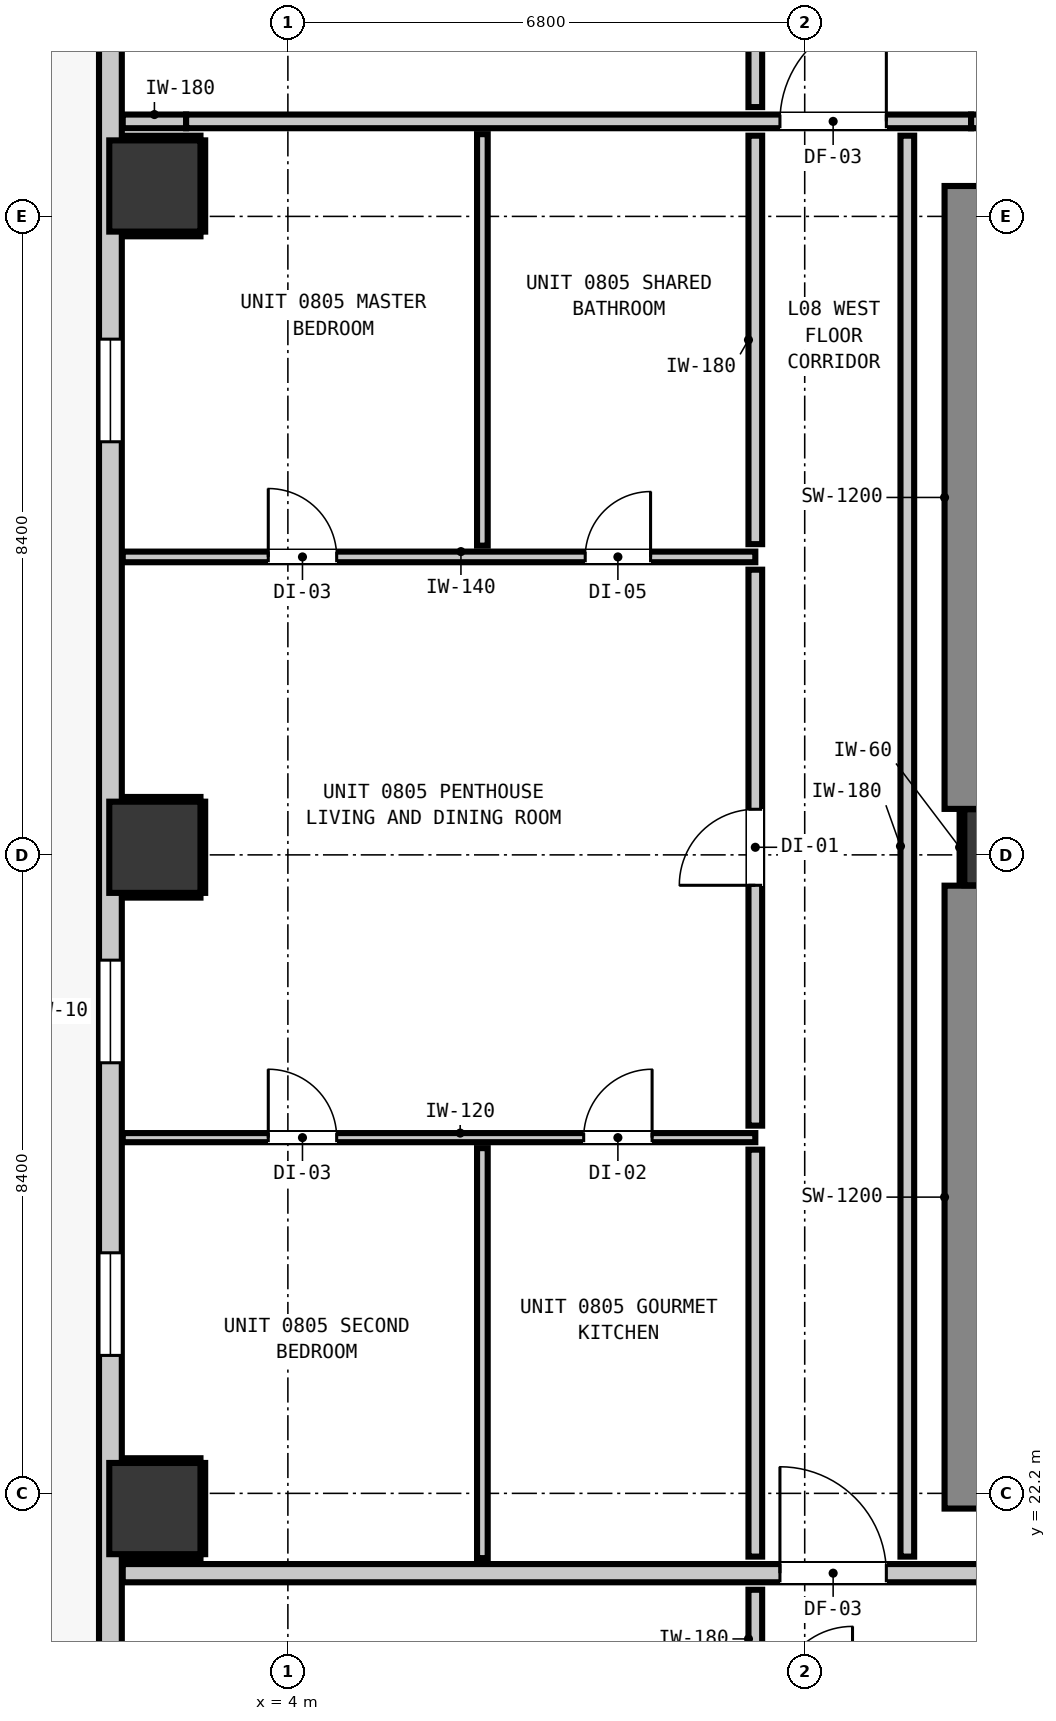
"""IFC4 building model, lengths in metres.
Left out: names, types, materials, properties, quantities, classifications, styles, units other than length and angle.
Written with IfcOpenShell. Run it as: python <this file> out.ifc"""

import sys

from ifc_helpers import new_model, si_unit, direction, frame, frame_2d, origin, origin_2d, place, context, subcontext, project, spatial, rectangle, extrude, element, fill, save


model = new_model("IFC4")
c1 = context("Model", 3, precision=1e-05, world=origin(), true_north=direction((0.0, 1.0)))
c2 = subcontext(c1, "Body", "Model", "MODEL_VIEW")
j1 = project(units=[si_unit("LENGTHUNIT", "METRE"), si_unit("PLANEANGLEUNIT", "RADIAN")], contexts=[c1])
p1 = place(None, origin())
s1 = spatial("IfcSite", under=j1, at=p1, CompositionType="ELEMENT")
p2 = place(p1, origin())
s2 = spatial("IfcBuilding", under=s1, at=p2, CompositionType="ELEMENT")
p3 = place(p2, frame((0.0, 0.0, 31.96)))
s3 = spatial("IfcBuildingStorey", under=s2, at=p3, CompositionType="ELEMENT", Elevation=31.96)
p4 = place(p3, frame((13.4, 30.7, 0.0), z_axis=(0.0, 0.0, 1.0), x_axis=(1.0, 0.0, 0.0)))
e1 = element("IfcColumn", 1, at=p4, inside=s3, PredefinedType="COLUMN", context=c2, shape_type="SweptSolid", body=[
    extrude(rectangle(XDim=1.0, YDim=1.0, at=origin_2d()), origin(), (0.0, 0.0, 1.0), 3.32),
])
p5 = place(p3, frame((13.24, 22.0, 0.0), z_axis=(0.0, 0.0, 1.0), x_axis=(0.0, 1.0, 0.0)))
e2 = element("IfcWall", 2, at=p5, inside=s3, PredefinedType="SHEAR", context=c2, shape_type="SweptSolid", body=[
    extrude(rectangle(XDim=8.195, YDim=1.2, at=frame_2d((4.098, 0.0))), origin(), (0.0, 0.0, 1.0), 3.32),
])
p6 = place(p3, frame((13.24, 31.205, 0.0), z_axis=(0.0, 0.0, 1.0), x_axis=(0.0, 1.0, 0.0)))
e3 = element("IfcWall", 3, at=p6, inside=s3, PredefinedType="SHEAR", context=c2, shape_type="SweptSolid", body=[
    extrude(rectangle(XDim=8.195, YDim=1.2, at=frame_2d((4.097, 0.0))), origin(), (0.0, 0.0, 1.0), 3.32),
])
for number, where, z_axis, x_axis in (
    (4, (2.25, 22.0, 0.0), (0.0, 0.0, 1.0), (1.0, 0.0, 0.0)),
    (5, (2.25, 30.7, 0.0), (0.0, 0.0, 1.0), (1.0, 0.0, 0.0)),
    (6, (2.25, 39.4, 0.0), (0.0, 0.0, 1.0), (1.0, 0.0, 0.0)),
):
    element("IfcColumn", number, at=place(p3, frame(where, z_axis=z_axis, x_axis=x_axis)), inside=s3, PredefinedType="COLUMN", context=c2, shape_type="SweptSolid", body=[
        extrude(rectangle(XDim=1.2, YDim=1.2, at=origin_2d()), origin(), (0.0, 0.0, 1.0), 3.32),
    ])
p7 = place(p3, frame((1.665, 10.165, 0.0), z_axis=(0.0, 0.0, 1.0), x_axis=(0.0, 1.0, 0.0)))
e7 = element("IfcWall", 7, at=p7, inside=s3, PredefinedType="STANDARD", context=c2, shape_type="SweptSolid", body=[
    extrude(rectangle(XDim=34.67, YDim=0.3, at=frame_2d((17.335, 0.0))), origin(), (0.0, 0.0, 1.0), 3.06),
])
p8 = place(p7, frame((0.901, 0.0, 0.0)))
e8 = element("IfcOpeningElement", 8, at=p8, cuts=e7, PredefinedType="OPENING", context=c2, shape_type="SweptSolid", body=[
    extrude(rectangle(XDim=1.0, YDim=2.15, at=frame_2d((0.5, 1.075))), frame((0.0, 0.16, 0.0), z_axis=(0.0, -1.0, 0.0), x_axis=(1.0, 0.0, 0.0)), (0.0, 0.0, 1.0), 0.32),
])
p9 = place(p7, frame((17.7, 0.0, 0.85)))
e9 = element("IfcOpeningElement", 9, at=p9, cuts=e7, PredefinedType="OPENING", context=c2, shape_type="SweptSolid", body=[
    extrude(rectangle(XDim=1.35, YDim=1.85, at=frame_2d((0.675, 0.925))), frame((0.0, 0.16, 0.0), z_axis=(0.0, -1.0, 0.0), x_axis=(1.0, 0.0, 0.0)), (0.0, 0.0, 1.0), 0.32),
])
p10 = place(p7, frame((13.85, 0.0, 0.85)))
e10 = element("IfcOpeningElement", 10, at=p10, cuts=e7, PredefinedType="OPENING", context=c2, shape_type="SweptSolid", body=[
    extrude(rectangle(XDim=1.35, YDim=1.85, at=frame_2d((0.675, 0.925))), frame((0.0, 0.16, 0.0), z_axis=(0.0, -1.0, 0.0), x_axis=(1.0, 0.0, 0.0)), (0.0, 0.0, 1.0), 0.32),
])
p11 = place(p7, frame((25.87, 0.0, 0.85)))
e11 = element("IfcOpeningElement", 11, at=p11, cuts=e7, PredefinedType="OPENING", context=c2, shape_type="SweptSolid", body=[
    extrude(rectangle(XDim=1.35, YDim=1.85, at=frame_2d((0.675, 0.925))), frame((0.0, 0.16, 0.0), z_axis=(0.0, -1.0, 0.0), x_axis=(1.0, 0.0, 0.0)), (0.0, 0.0, 1.0), 0.32),
])
p12 = place(p3, frame((1.827, 21.15, 0.0), z_axis=(0.0, 0.0, 1.0), x_axis=(1.0, 0.0, 0.0)))
e12 = element("IfcWall", 12, at=p12, inside=s3, PredefinedType="PARTITIONING", context=c2, shape_type="SweptSolid", body=[
    extrude(rectangle(XDim=42.146, YDim=0.24, at=frame_2d((21.073, 0.0))), origin(), (0.0, 0.0, 1.0), 3.06),
])
p13 = place(p12, frame((16.383, 0.0, 0.0)))
e13 = element("IfcOpeningElement", 13, at=p13, cuts=e12, PredefinedType="OPENING", context=c2, shape_type="SweptSolid", body=[
    extrude(rectangle(XDim=1.1, YDim=2.15, at=frame_2d((0.55, 1.075))), frame((0.0, 0.13, 0.0), z_axis=(0.0, -1.0, 0.0), x_axis=(1.0, 0.0, 0.0)), (0.0, 0.0, 1.0), 0.26),
])
p14 = place(p12, frame((8.647, 0.0, 0.0)))
e14 = element("IfcOpeningElement", 14, at=p14, cuts=e12, PredefinedType="OPENING", context=c2, shape_type="SweptSolid", body=[
    extrude(rectangle(XDim=1.4, YDim=2.15, at=frame_2d((0.7, 1.075))), frame((0.0, 0.13, 0.0), z_axis=(0.0, -1.0, 0.0), x_axis=(1.0, 0.0, 0.0)), (0.0, 0.0, 1.0), 0.26),
])
p15 = place(p12, frame((38.574, 0.0, 0.0)))
e15 = element("IfcOpeningElement", 15, at=p15, cuts=e12, PredefinedType="OPENING", context=c2, shape_type="SweptSolid", body=[
    extrude(rectangle(XDim=0.9, YDim=2.1, at=frame_2d((0.45, 1.05))), frame((0.0, 0.13, 0.0), z_axis=(0.0, -1.0, 0.0), x_axis=(1.0, 0.0, 0.0)), (0.0, 0.0, 1.0), 0.26),
])
p16 = place(p3, frame((1.827, 40.25, 0.0), z_axis=(0.0, 0.0, 1.0), x_axis=(1.0, 0.0, 0.0)))
e16 = element("IfcWall", 16, at=p16, inside=s3, PredefinedType="PARTITIONING", context=c2, shape_type="SweptSolid", body=[
    extrude(rectangle(XDim=0.834, YDim=0.18, at=frame_2d((0.417, 0.0))), origin(), (0.0, 0.0, 1.0), 3.06),
])
p17 = place(p3, frame((2.661, 40.25, 0.0), z_axis=(0.0, 0.0, 1.0), x_axis=(1.0, 0.0, 0.0)))
e17 = element("IfcWall", 17, at=p17, inside=s3, PredefinedType="PARTITIONING", context=c2, shape_type="SweptSolid", body=[
    extrude(rectangle(XDim=10.328, YDim=0.18, at=frame_2d((5.164, 0.0))), origin(), (0.0, 0.0, 1.0), 2.445),
])
p18 = place(p17, frame((7.813, 0.0, 0.0)))
e18 = element("IfcOpeningElement", 18, at=p18, cuts=e17, PredefinedType="OPENING", context=c2, shape_type="SweptSolid", body=[
    extrude(rectangle(XDim=1.4, YDim=2.15, at=frame_2d((0.7, 1.075))), frame((0.0, 0.1, 0.0), z_axis=(0.0, -1.0, 0.0), x_axis=(1.0, 0.0, 0.0)), (0.0, 0.0, 1.0), 0.2),
])
p19 = place(p3, frame((12.989, 40.25, 0.0), z_axis=(0.0, 0.0, 1.0), x_axis=(1.0, 0.0, 0.0)))
e19 = element("IfcWall", 19, at=p19, inside=s3, PredefinedType="PARTITIONING", context=c2, shape_type="SweptSolid", body=[
    extrude(rectangle(XDim=30.984, YDim=0.18, at=frame_2d((15.492, 0.0))), origin(), (0.0, 0.0, 1.0), 3.06),
])
p20 = place(p19, frame((4.446, 0.0, 0.0)))
e20 = element("IfcOpeningElement", 20, at=p20, cuts=e19, PredefinedType="OPENING", context=c2, shape_type="SweptSolid", body=[
    extrude(rectangle(XDim=1.4, YDim=2.15, at=frame_2d((0.7, 1.075))), frame((0.0, 0.1, 0.0), z_axis=(0.0, -1.0, 0.0), x_axis=(1.0, 0.0, 0.0)), (0.0, 0.0, 1.0), 0.2),
])
p21 = place(p19, frame((27.362, 0.0, 0.0)))
e21 = element("IfcOpeningElement", 21, at=p21, cuts=e19, PredefinedType="OPENING", context=c2, shape_type="SweptSolid", body=[
    extrude(rectangle(XDim=1.0, YDim=2.15, at=frame_2d((0.5, 1.075))), frame((0.0, 0.1, 0.0), z_axis=(0.0, -1.0, 0.0), x_axis=(1.0, 0.0, 0.0)), (0.0, 0.0, 1.0), 0.2),
])
p22 = place(p3, frame((1.827, 34.52, 0.0), z_axis=(0.0, 0.0, 1.0), x_axis=(1.0, 0.0, 0.0)))
e22 = element("IfcWall", 22, at=p22, inside=s3, PredefinedType="PARTITIONING", context=c2, shape_type="SweptSolid", body=[
    extrude(rectangle(XDim=8.323, YDim=0.14, at=frame_2d((4.162, 0.0))), origin(), (0.0, 0.0, 1.0), 3.06),
])
p23 = place(p22, frame((6.085, 0.0, 0.0)))
e23 = element("IfcOpeningElement", 23, at=p23, cuts=e22, PredefinedType="OPENING", context=c2, shape_type="SweptSolid", body=[
    extrude(rectangle(XDim=0.86, YDim=2.02, at=frame_2d((0.43, 1.01))), frame((0.0, 0.08, 0.0), z_axis=(0.0, -1.0, 0.0), x_axis=(1.0, 0.0, 0.0)), (0.0, 0.0, 1.0), 0.16),
])
p24 = place(p22, frame((1.915, 0.0, 0.0)))
e24 = element("IfcOpeningElement", 24, at=p24, cuts=e22, PredefinedType="OPENING", context=c2, shape_type="SweptSolid", body=[
    extrude(rectangle(XDim=0.9, YDim=2.1, at=frame_2d((0.45, 1.05))), frame((0.0, 0.08, 0.0), z_axis=(0.0, -1.0, 0.0), x_axis=(1.0, 0.0, 0.0)), (0.0, 0.0, 1.0), 0.16),
])
p25 = place(p3, frame((1.827, 26.88, 0.0), z_axis=(0.0, 0.0, 1.0), x_axis=(1.0, 0.0, 0.0)))
e25 = element("IfcWall", 25, at=p25, inside=s3, PredefinedType="PARTITIONING", context=c2, shape_type="SweptSolid", body=[
    extrude(rectangle(XDim=8.323, YDim=0.12, at=frame_2d((4.162, 0.0))), origin(), (0.0, 0.0, 1.0), 3.06),
])
p26 = place(p25, frame((6.065, 0.0, 0.0)))
e26 = element("IfcOpeningElement", 26, at=p26, cuts=e25, PredefinedType="OPENING", context=c2, shape_type="SweptSolid", body=[
    extrude(rectangle(XDim=0.9, YDim=2.1, at=frame_2d((0.45, 1.05))), frame((0.0, 0.07, 0.0), z_axis=(0.0, -1.0, 0.0), x_axis=(1.0, 0.0, 0.0)), (0.0, 0.0, 1.0), 0.14),
])
p27 = place(p25, frame((1.915, 0.0, 0.0)))
e27 = element("IfcOpeningElement", 27, at=p27, cuts=e25, PredefinedType="OPENING", context=c2, shape_type="SweptSolid", body=[
    extrude(rectangle(XDim=0.9, YDim=2.1, at=frame_2d((0.45, 1.05))), frame((0.0, 0.07, 0.0), z_axis=(0.0, -1.0, 0.0), x_axis=(1.0, 0.0, 0.0)), (0.0, 0.0, 1.0), 0.14),
])
p28 = place(p3, frame((10.15, 19.638, 0.0), z_axis=(0.0, 0.0, 1.0), x_axis=(0.0, 1.0, 0.0)))
e28 = element("IfcWall", 28, at=p28, inside=s3, PredefinedType="PARTITIONING", context=c2, shape_type="SweptSolid", body=[
    extrude(rectangle(XDim=1.294, YDim=0.18, at=frame_2d((0.647, 0.0))), origin(), (0.0, 0.0, 1.0), 3.06),
])
p29 = place(p3, frame((10.15, 21.368, 0.0), z_axis=(0.0, 0.0, 1.0), x_axis=(0.0, 1.0, 0.0)))
e29 = element("IfcWall", 29, at=p29, inside=s3, PredefinedType="PARTITIONING", context=c2, shape_type="SweptSolid", body=[
    extrude(rectangle(XDim=5.354, YDim=0.18, at=frame_2d((2.677, 0.0))), origin(), (0.0, 0.0, 1.0), 3.06),
])
p30 = place(p3, frame((10.15, 27.038, 0.0), z_axis=(0.0, 0.0, 1.0), x_axis=(0.0, 1.0, 0.0)))
e30 = element("IfcWall", 30, at=p30, inside=s3, PredefinedType="PARTITIONING", context=c2, shape_type="SweptSolid", body=[
    extrude(rectangle(XDim=7.314, YDim=0.18, at=frame_2d((3.657, 0.0))), origin(), (0.0, 0.0, 1.0), 3.06),
])
p31 = place(p30, frame((3.162, 0.0, 0.0)))
e31 = element("IfcOpeningElement", 31, at=p31, cuts=e30, PredefinedType="OPENING", context=c2, shape_type="SweptSolid", body=[
    extrude(rectangle(XDim=1.0, YDim=2.15, at=frame_2d((0.5, 1.075))), frame((0.0, 0.1, 0.0), z_axis=(0.0, -1.0, 0.0), x_axis=(1.0, 0.0, 0.0)), (0.0, 0.0, 1.0), 0.2),
])
p32 = place(p3, frame((10.15, 34.688, 0.0), z_axis=(0.0, 0.0, 1.0), x_axis=(0.0, 1.0, 0.0)))
e32 = element("IfcWall", 32, at=p32, inside=s3, PredefinedType="PARTITIONING", context=c2, shape_type="SweptSolid", body=[
    extrude(rectangle(XDim=5.374, YDim=0.18, at=frame_2d((2.687, 0.0))), origin(), (0.0, 0.0, 1.0), 3.06),
])
p33 = place(p3, frame((10.15, 40.438, 0.0), z_axis=(0.0, 0.0, 1.0), x_axis=(0.0, 1.0, 0.0)))
e33 = element("IfcWall", 33, at=p33, inside=s3, PredefinedType="PARTITIONING", context=c2, shape_type="SweptSolid", body=[
    extrude(rectangle(XDim=1.324, YDim=0.18, at=frame_2d((0.662, 0.0))), origin(), (0.0, 0.0, 1.0), 3.06),
])
p34 = place(p3, frame((12.15, 21.368, 0.0), z_axis=(0.0, 0.0, 1.0), x_axis=(0.0, 1.0, 0.0)))
e34 = element("IfcWall", 34, at=p34, inside=s3, PredefinedType="PARTITIONING", context=c2, shape_type="SweptSolid", body=[
    extrude(rectangle(XDim=18.694, YDim=0.18, at=frame_2d((9.347, 0.0))), origin(), (0.0, 0.0, 1.0), 3.06),
])
p35 = place(p3, frame((6.559, 21.348, 0.0), z_axis=(0.0, 0.0, 1.0), x_axis=(0.0, 1.0, 0.0)))
e35 = element("IfcWall", 35, at=p35, inside=s3, PredefinedType="PARTITIONING", context=c2, shape_type="SweptSolid", body=[
    extrude(rectangle(XDim=5.394, YDim=0.14, at=frame_2d((2.697, 0.0))), origin(), (0.0, 0.0, 1.0), 3.06),
])
p36 = place(p3, frame((6.559, 34.668, 0.0), z_axis=(0.0, 0.0, 1.0), x_axis=(0.0, 1.0, 0.0)))
e36 = element("IfcWall", 36, at=p36, inside=s3, PredefinedType="PARTITIONING", context=c2, shape_type="SweptSolid", body=[
    extrude(rectangle(XDim=5.414, YDim=0.14, at=frame_2d((2.707, 0.0))), origin(), (0.0, 0.0, 1.0), 3.06),
])
p37 = place(p3, frame((12.868, 30.21, 0.0), z_axis=(0.0, 0.0, 1.0), x_axis=(0.0, 1.0, 0.0)))
e37 = element("IfcWall", 37, at=p37, inside=s3, PredefinedType="PARTITIONING", context=c2, shape_type="SweptSolid", body=[
    extrude(rectangle(XDim=0.98, YDim=0.06, at=frame_2d((0.49, 0.0))), origin(), (0.0, 0.0, 1.0), 1.45),
])
for number, where, z_axis, x_axis in (
    (38, (1.83, 21.368, 0.0), (0.0, 0.0, 1.0), (1.0, 0.0, 0.0)),
    (39, (1.83, 22.632, 0.0), (0.0, 0.0, 1.0), (1.0, 0.0, 0.0)),
):
    element("IfcWall", number, at=place(p3, frame(where, z_axis=z_axis, x_axis=x_axis)), inside=s3, PredefinedType="PARTITIONING", context=c2, shape_type="SweptSolid", body=[
        extrude(rectangle(XDim=1.02, YDim=0.06, at=frame_2d((0.51, 0.0))), origin(), (0.0, 0.0, 1.0), 1.45),
    ])
p38 = place(p3, frame((2.882, 21.4, 0.0), z_axis=(0.0, 0.0, 1.0), x_axis=(0.0, 1.0, 0.0)))
e40 = element("IfcWall", 40, at=p38, inside=s3, PredefinedType="PARTITIONING", context=c2, shape_type="SweptSolid", body=[
    extrude(rectangle(XDim=1.2, YDim=0.06, at=frame_2d((0.6, 0.0))), origin(), (0.0, 0.0, 1.0), 1.45),
])
for number, where, z_axis, x_axis in (
    (41, (1.83, 30.068, 0.0), (0.0, 0.0, 1.0), (1.0, 0.0, 0.0)),
    (42, (1.83, 31.332, 0.0), (0.0, 0.0, 1.0), (1.0, 0.0, 0.0)),
):
    element("IfcWall", number, at=place(p3, frame(where, z_axis=z_axis, x_axis=x_axis)), inside=s3, PredefinedType="PARTITIONING", context=c2, shape_type="SweptSolid", body=[
        extrude(rectangle(XDim=1.02, YDim=0.06, at=frame_2d((0.51, 0.0))), origin(), (0.0, 0.0, 1.0), 1.45),
    ])
p39 = place(p3, frame((2.882, 30.1, 0.0), z_axis=(0.0, 0.0, 1.0), x_axis=(0.0, 1.0, 0.0)))
e43 = element("IfcWall", 43, at=p39, inside=s3, PredefinedType="PARTITIONING", context=c2, shape_type="SweptSolid", body=[
    extrude(rectangle(XDim=1.2, YDim=0.06, at=frame_2d((0.6, 0.0))), origin(), (0.0, 0.0, 1.0), 1.45),
])
for number, where, z_axis, x_axis in (
    (44, (1.83, 38.768, 0.0), (0.0, 0.0, 1.0), (1.0, 0.0, 0.0)),
    (45, (1.83, 40.032, 0.0), (0.0, 0.0, 1.0), (1.0, 0.0, 0.0)),
):
    element("IfcWall", number, at=place(p3, frame(where, z_axis=z_axis, x_axis=x_axis)), inside=s3, PredefinedType="PARTITIONING", context=c2, shape_type="SweptSolid", body=[
        extrude(rectangle(XDim=1.02, YDim=0.06, at=frame_2d((0.51, 0.0))), origin(), (0.0, 0.0, 1.0), 1.45),
    ])
p40 = place(p3, frame((2.882, 38.8, 0.0), z_axis=(0.0, 0.0, 1.0), x_axis=(0.0, 1.0, 0.0)))
e46 = element("IfcWall", 46, at=p40, inside=s3, PredefinedType="PARTITIONING", context=c2, shape_type="SweptSolid", body=[
    extrude(rectangle(XDim=1.2, YDim=0.06, at=frame_2d((0.6, 0.0))), origin(), (0.0, 0.0, 1.0), 1.45),
])
p41 = place(p9, origin())
e47 = element("IfcWindow", 47, at=p41, inside=s3, PartitioningType="SINGLE_PANEL", PredefinedType="WINDOW", context=c2, shape_type="SweptSolid", body=[
    extrude(rectangle(XDim=1.35, YDim=1.85, at=frame_2d((0.675, 0.925))), frame((0.0, 0.03, 0.0), z_axis=(0.0, -1.0, 0.0), x_axis=(1.0, 0.0, 0.0)), (0.0, 0.0, 1.0), 0.06),
])
fill(e9, e47)
p42 = place(p10, origin())
e48 = element("IfcWindow", 48, at=p42, inside=s3, PartitioningType="SINGLE_PANEL", PredefinedType="WINDOW", context=c2, shape_type="SweptSolid", body=[
    extrude(rectangle(XDim=1.35, YDim=1.85, at=frame_2d((0.675, 0.925))), frame((0.0, 0.03, 0.0), z_axis=(0.0, -1.0, 0.0), x_axis=(1.0, 0.0, 0.0)), (0.0, 0.0, 1.0), 0.06),
])
fill(e10, e48)
p43 = place(p11, origin())
e49 = element("IfcWindow", 49, at=p43, inside=s3, PartitioningType="SINGLE_PANEL", PredefinedType="WINDOW", context=c2, shape_type="SweptSolid", body=[
    extrude(rectangle(XDim=1.35, YDim=1.85, at=frame_2d((0.675, 0.925))), frame((0.0, 0.03, 0.0), z_axis=(0.0, -1.0, 0.0), x_axis=(1.0, 0.0, 0.0)), (0.0, 0.0, 1.0), 0.06),
])
fill(e11, e49)
p44 = place(p14, origin())
e50 = element("IfcDoor", 50, at=p44, inside=s3, OperationType="SINGLE_SWING_LEFT", PredefinedType="DOOR", context=c2, shape_type="SweptSolid", body=[
    extrude(rectangle(XDim=1.4, YDim=2.15, at=frame_2d((0.7, 1.075))), frame((0.0, 0.025, 0.0), z_axis=(0.0, -1.0, 0.0), x_axis=(1.0, 0.0, 0.0)), (0.0, 0.0, 1.0), 0.05),
])
fill(e14, e50)
p45 = place(p18, origin())
e51 = element("IfcDoor", 51, at=p45, inside=s3, OperationType="SINGLE_SWING_RIGHT", PredefinedType="DOOR", context=c2, shape_type="SweptSolid", body=[
    extrude(rectangle(XDim=1.4, YDim=2.15, at=frame_2d((0.7, 1.075))), frame((0.0, 0.025, 0.0), z_axis=(0.0, -1.0, 0.0), x_axis=(1.0, 0.0, 0.0)), (0.0, 0.0, 1.0), 0.05),
])
fill(e18, e51)
p46 = place(p31, origin())
e52 = element("IfcDoor", 52, at=p46, inside=s3, OperationType="SINGLE_SWING_LEFT", PredefinedType="DOOR", context=c2, shape_type="SweptSolid", body=[
    extrude(rectangle(XDim=1.0, YDim=2.15, at=frame_2d((0.5, 1.075))), frame((0.0, 0.025, 0.0), z_axis=(0.0, -1.0, 0.0), x_axis=(1.0, 0.0, 0.0)), (0.0, 0.0, 1.0), 0.05),
])
fill(e31, e52)
p47 = place(p26, origin())
e53 = element("IfcDoor", 53, at=p47, inside=s3, OperationType="SINGLE_SWING_RIGHT", PredefinedType="DOOR", context=c2, shape_type="SweptSolid", body=[
    extrude(rectangle(XDim=0.9, YDim=2.1, at=frame_2d((0.45, 1.05))), frame((0.0, 0.025, 0.0), z_axis=(0.0, -1.0, 0.0), x_axis=(1.0, 0.0, 0.0)), (0.0, 0.0, 1.0), 0.05),
])
fill(e26, e53)
p48 = place(p27, origin())
e54 = element("IfcDoor", 54, at=p48, inside=s3, OperationType="SINGLE_SWING_LEFT", PredefinedType="DOOR", context=c2, shape_type="SweptSolid", body=[
    extrude(rectangle(XDim=0.9, YDim=2.1, at=frame_2d((0.45, 1.05))), frame((0.0, 0.025, 0.0), z_axis=(0.0, -1.0, 0.0), x_axis=(1.0, 0.0, 0.0)), (0.0, 0.0, 1.0), 0.05),
])
fill(e27, e54)
p49 = place(p23, origin())
e55 = element("IfcDoor", 55, at=p49, inside=s3, OperationType="SINGLE_SWING_RIGHT", PredefinedType="DOOR", context=c2, shape_type="SweptSolid", body=[
    extrude(rectangle(XDim=0.86, YDim=2.02, at=frame_2d((0.43, 1.01))), frame((0.0, 0.025, 0.0), z_axis=(0.0, -1.0, 0.0), x_axis=(1.0, 0.0, 0.0)), (0.0, 0.0, 1.0), 0.05),
])
fill(e23, e55)
p50 = place(p24, origin())
e56 = element("IfcDoor", 56, at=p50, inside=s3, OperationType="SINGLE_SWING_LEFT", PredefinedType="DOOR", context=c2, shape_type="SweptSolid", body=[
    extrude(rectangle(XDim=0.9, YDim=2.1, at=frame_2d((0.45, 1.05))), frame((0.0, 0.025, 0.0), z_axis=(0.0, -1.0, 0.0), x_axis=(1.0, 0.0, 0.0)), (0.0, 0.0, 1.0), 0.05),
])
fill(e24, e56)
save(model, sys.argv[1])
